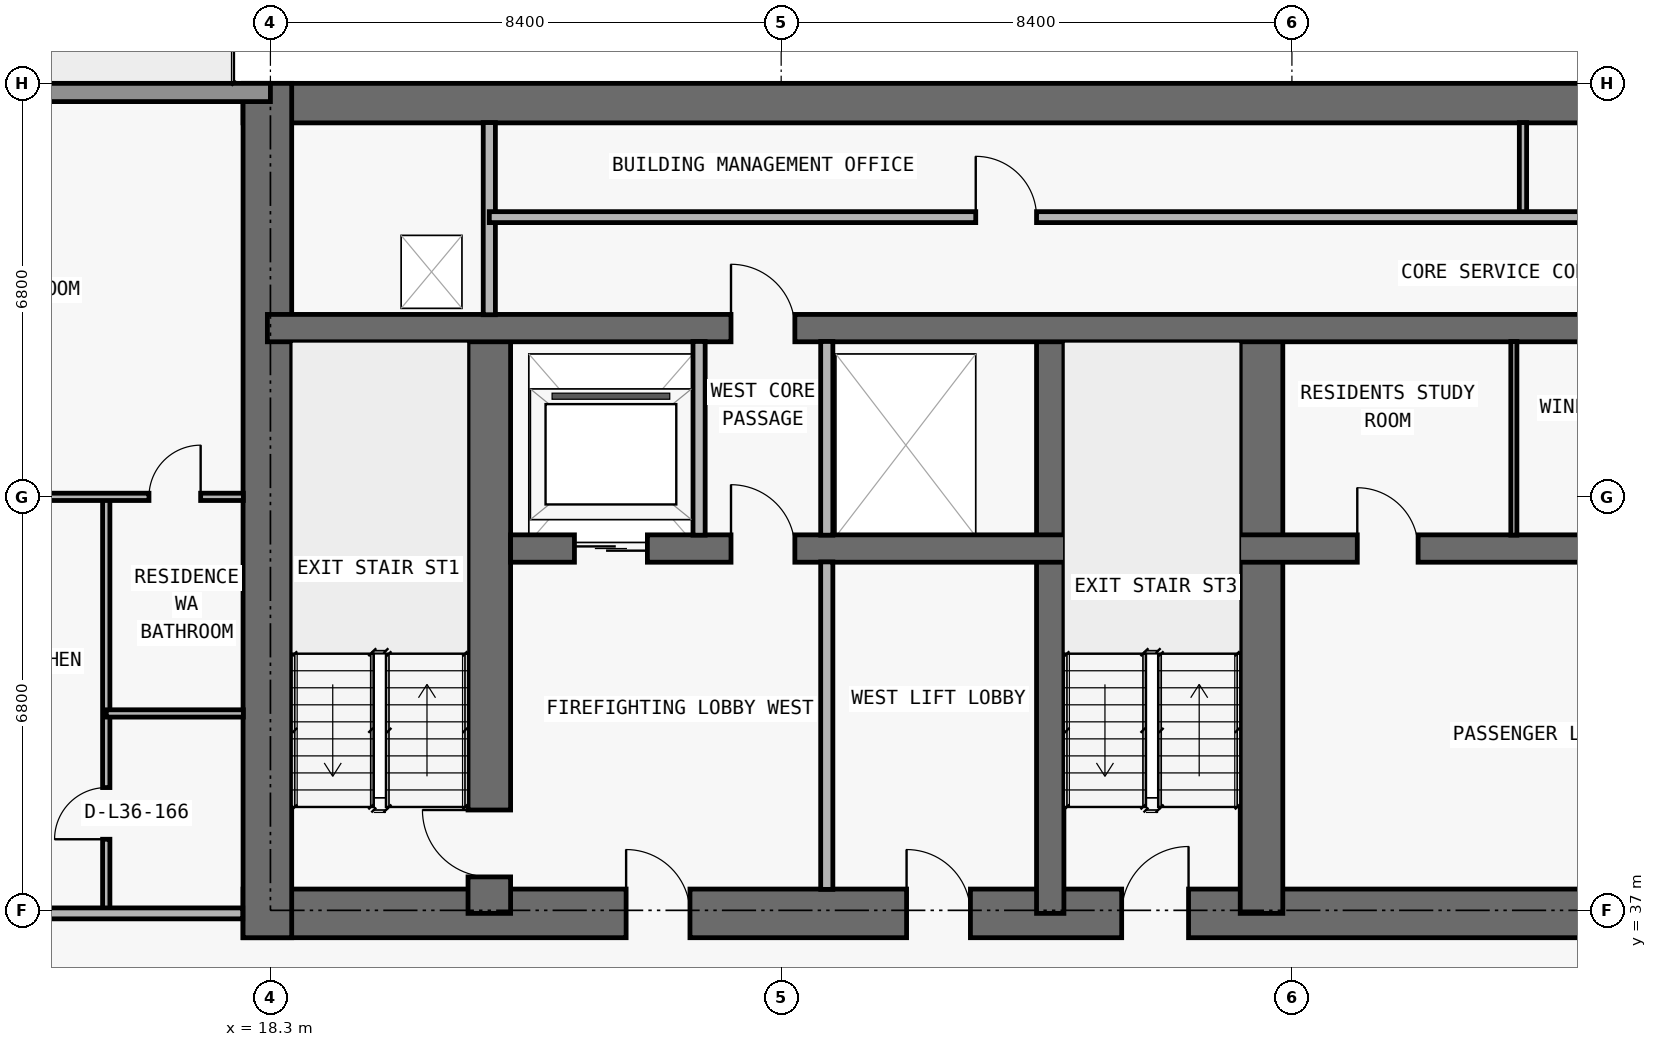
"""IFC4 building model, lengths in metres.
Left out: names, types, materials, properties, quantities, classifications, styles, units other than length and angle.
Written with IfcOpenShell. Run it as: python <this file> out.ifc"""

import sys

from ifc_helpers import new_model, si_unit, direction, frame, frame_2d, origin, place, context, subcontext, project, spatial, rectangle, extrude, element, fill, save


model = new_model("IFC4")
c1 = context("Model", 3, precision=1e-05, world=origin(), true_north=direction((0.0, 1.0)))
c2 = subcontext(c1, "Body", "Model", "MODEL_VIEW")
j1 = project(units=[si_unit("LENGTHUNIT", "METRE"), si_unit("PLANEANGLEUNIT", "RADIAN")], contexts=[c1])
p1 = place(None, origin())
s1 = spatial("IfcSite", under=j1, at=p1, CompositionType="ELEMENT")
p2 = place(p1, origin())
s2 = spatial("IfcBuilding", under=s1, at=p2, CompositionType="ELEMENT")
p3 = place(p2, frame((0.0, 0.0, 132.3)))
s3 = spatial("IfcBuildingStorey", under=s2, at=p3, CompositionType="ELEMENT", Elevation=132.3)
p4 = place(p3, frame((17.85, 36.95, 0.0), z_axis=(0.0, 0.0, 1.0), x_axis=(1.0, 0.0, 0.0)))
e1 = element("IfcWall", 1, at=p4, inside=s3, PredefinedType="SHEAR", context=c2, shape_type="SweptSolid", body=[
    extrude(rectangle(XDim=42.1, YDim=0.8, at=frame_2d((21.05, 0.0))), origin(), (0.0, 0.0, 1.0), 3.05),
])
p5 = place(p4, frame((14.45, 0.0, 0.0)))
e2 = element("IfcOpeningElement", 2, at=p5, cuts=e1, PredefinedType="OPENING", context=c2, shape_type="SweptSolid", body=[
    extrude(rectangle(XDim=1.1, YDim=2.15, at=frame_2d((0.55, 1.075))), frame((0.0, 0.41, 0.0), z_axis=(0.0, -1.0, 0.0), x_axis=(1.0, 0.0, 0.0)), (0.0, 0.0, 1.0), 0.82),
])
p6 = place(p4, frame((6.3, 0.0, 0.0)))
e3 = element("IfcOpeningElement", 3, at=p6, cuts=e1, PredefinedType="OPENING", context=c2, shape_type="SweptSolid", body=[
    extrude(rectangle(XDim=1.05, YDim=2.15, at=frame_2d((0.525, 1.075))), frame((0.0, 0.41, 0.0), z_axis=(0.0, -1.0, 0.0), x_axis=(1.0, 0.0, 0.0)), (0.0, 0.0, 1.0), 0.82),
])
p7 = place(p4, frame((34.8, 0.0, 0.0)))
e4 = element("IfcOpeningElement", 4, at=p7, cuts=e1, PredefinedType="OPENING", context=c2, shape_type="SweptSolid", body=[
    extrude(rectangle(XDim=1.05, YDim=2.15, at=frame_2d((0.525, 1.075))), frame((0.0, 0.41, 0.0), z_axis=(0.0, -1.0, 0.0), x_axis=(1.0, 0.0, 0.0)), (0.0, 0.0, 1.0), 0.82),
])
p8 = place(p4, frame((10.913, 0.0, 0.0)))
e5 = element("IfcOpeningElement", 5, at=p8, cuts=e1, PredefinedType="OPENING", context=c2, shape_type="SweptSolid", body=[
    extrude(rectangle(XDim=1.05, YDim=2.15, at=frame_2d((0.525, 1.075))), frame((0.0, 0.41, 0.0), z_axis=(0.0, -1.0, 0.0), x_axis=(1.0, 0.0, 0.0)), (0.0, 0.0, 1.0), 0.82),
])
p9 = place(p4, frame((24.15, 0.0, 0.0)))
e6 = element("IfcOpeningElement", 6, at=p9, cuts=e1, PredefinedType="OPENING", context=c2, shape_type="SweptSolid", body=[
    extrude(rectangle(XDim=1.05, YDim=2.15, at=frame_2d((0.525, 1.075))), frame((0.0, 0.41, 0.0), z_axis=(0.0, -1.0, 0.0), x_axis=(1.0, 0.0, 0.0)), (0.0, 0.0, 1.0), 0.82),
])
p10 = place(p3, frame((17.85, 50.275, 0.0), z_axis=(0.0, 0.0, 1.0), x_axis=(1.0, 0.0, 0.0)))
e7 = element("IfcWall", 7, at=p10, inside=s3, PredefinedType="SHEAR", context=c2, shape_type="SweptSolid", body=[
    extrude(rectangle(XDim=42.1, YDim=0.65, at=frame_2d((21.05, 0.0))), origin(), (0.0, 0.0, 1.0), 3.05),
])
p11 = place(p3, frame((18.25, 36.55, 0.0), z_axis=(0.0, 0.0, 1.0), x_axis=(0.0, 1.0, 0.0)))
e8 = element("IfcWall", 8, at=p11, inside=s3, PredefinedType="SHEAR", context=c2, shape_type="SweptSolid", body=[
    extrude(rectangle(XDim=14.05, YDim=0.8, at=frame_2d((7.025, 0.0))), origin(), (0.0, 0.0, 1.0), 3.05),
])
p12 = place(p3, frame((21.9, 36.95, 0.0), z_axis=(0.0, 0.0, 1.0), x_axis=(0.0, 1.0, 0.0)))
e9 = element("IfcWall", 9, at=p12, inside=s3, PredefinedType="SHEAR", context=c2, shape_type="SweptSolid", body=[
    extrude(rectangle(XDim=9.625, YDim=0.7, at=frame_2d((4.812, 0.0))), origin(), (0.0, 0.0, 1.0), 3.05),
])
p13 = place(p12, frame((0.6, 0.0, 0.0)))
e10 = element("IfcOpeningElement", 10, at=p13, cuts=e9, PredefinedType="OPENING", context=c2, shape_type="SweptSolid", body=[
    extrude(rectangle(XDim=1.1, YDim=2.15, at=frame_2d((0.55, 1.075))), frame((0.0, 0.36, 0.0), z_axis=(0.0, -1.0, 0.0), x_axis=(1.0, 0.0, 0.0)), (0.0, 0.0, 1.0), 0.72),
])
p14 = place(p3, frame((31.125, 36.95, 0.0), z_axis=(0.0, 0.0, 1.0), x_axis=(0.0, 1.0, 0.0)))
e11 = element("IfcWall", 11, at=p14, inside=s3, PredefinedType="SHEAR", context=c2, shape_type="SweptSolid", body=[
    extrude(rectangle(XDim=9.625, YDim=0.45, at=frame_2d((4.812, 0.0))), origin(), (0.0, 0.0, 1.0), 3.05),
])
p15 = place(p3, frame((34.6, 36.95, 0.0), z_axis=(0.0, 0.0, 1.0), x_axis=(0.0, 1.0, 0.0)))
e12 = element("IfcWall", 12, at=p15, inside=s3, PredefinedType="SHEAR", context=c2, shape_type="SweptSolid", body=[
    extrude(rectangle(XDim=9.625, YDim=0.7, at=frame_2d((4.812, 0.0))), origin(), (0.0, 0.0, 1.0), 3.05),
])
p16 = place(p3, frame((22.25, 42.95, 0.0), z_axis=(0.0, 0.0, 1.0), x_axis=(1.0, 0.0, 0.0)))
e13 = element("IfcWall", 13, at=p16, inside=s3, PredefinedType="SHEAR", context=c2, shape_type="SweptSolid", body=[
    extrude(rectangle(XDim=33.3, YDim=0.45, at=frame_2d((16.65, 0.0))), origin(), (0.0, 0.0, 1.0), 3.05),
])
p17 = place(p16, frame((1.05, 0.0, 0.0)))
e14 = element("IfcOpeningElement", 14, at=p17, cuts=e13, PredefinedType="OPENING", context=c2, shape_type="SweptSolid", body=[
    extrude(rectangle(XDim=1.2, YDim=2.2, at=frame_2d((0.6, 1.1))), frame((0.0, 0.235, 0.0), z_axis=(0.0, -1.0, 0.0), x_axis=(1.0, 0.0, 0.0)), (0.0, 0.0, 1.0), 0.47),
])
p18 = place(p16, frame((31.05, 0.0, 0.0)))
e15 = element("IfcOpeningElement", 15, at=p18, cuts=e13, PredefinedType="OPENING", context=c2, shape_type="SweptSolid", body=[
    extrude(rectangle(XDim=1.2, YDim=2.2, at=frame_2d((0.6, 1.1))), frame((0.0, 0.235, 0.0), z_axis=(0.0, -1.0, 0.0), x_axis=(1.0, 0.0, 0.0)), (0.0, 0.0, 1.0), 0.47),
])
p19 = place(p16, frame((21.4, 0.0, 0.0)))
e16 = element("IfcOpeningElement", 16, at=p19, cuts=e13, PredefinedType="OPENING", context=c2, shape_type="SweptSolid", body=[
    extrude(rectangle(XDim=1.1, YDim=2.2, at=frame_2d((0.55, 1.1))), frame((0.0, 0.235, 0.0), z_axis=(0.0, -1.0, 0.0), x_axis=(1.0, 0.0, 0.0)), (0.0, 0.0, 1.0), 0.47),
])
p20 = place(p16, frame((24.0, 0.0, 0.0)))
e17 = element("IfcOpeningElement", 17, at=p20, cuts=e13, PredefinedType="OPENING", context=c2, shape_type="SweptSolid", body=[
    extrude(rectangle(XDim=1.1, YDim=2.2, at=frame_2d((0.55, 1.1))), frame((0.0, 0.235, 0.0), z_axis=(0.0, -1.0, 0.0), x_axis=(1.0, 0.0, 0.0)), (0.0, 0.0, 1.0), 0.47),
])
p21 = place(p16, frame((3.625, 0.0, 0.0)))
e18 = element("IfcOpeningElement", 18, at=p21, cuts=e13, PredefinedType="OPENING", context=c2, shape_type="SweptSolid", body=[
    extrude(rectangle(XDim=1.05, YDim=2.15, at=frame_2d((0.525, 1.075))), frame((0.0, 0.235, 0.0), z_axis=(0.0, -1.0, 0.0), x_axis=(1.0, 0.0, 0.0)), (0.0, 0.0, 1.0), 0.47),
])
p22 = place(p16, frame((28.675, 0.0, 0.0)))
e19 = element("IfcOpeningElement", 19, at=p22, cuts=e13, PredefinedType="OPENING", context=c2, shape_type="SweptSolid", body=[
    extrude(rectangle(XDim=1.05, YDim=2.15, at=frame_2d((0.525, 1.075))), frame((0.0, 0.235, 0.0), z_axis=(0.0, -1.0, 0.0), x_axis=(1.0, 0.0, 0.0)), (0.0, 0.0, 1.0), 0.47),
])
p23 = place(p16, frame((13.925, 0.0, 0.0)))
e20 = element("IfcOpeningElement", 20, at=p23, cuts=e13, PredefinedType="OPENING", context=c2, shape_type="SweptSolid", body=[
    extrude(rectangle(XDim=1.0, YDim=2.2, at=frame_2d((0.5, 1.1))), frame((0.0, 0.235, 0.0), z_axis=(0.0, -1.0, 0.0), x_axis=(1.0, 0.0, 0.0)), (0.0, 0.0, 1.0), 0.47),
])
p24 = place(p16, frame((18.05, 0.0, 0.0)))
e21 = element("IfcOpeningElement", 21, at=p24, cuts=e13, PredefinedType="OPENING", context=c2, shape_type="SweptSolid", body=[
    extrude(rectangle(XDim=1.0, YDim=2.2, at=frame_2d((0.5, 1.1))), frame((0.0, 0.235, 0.0), z_axis=(0.0, -1.0, 0.0), x_axis=(1.0, 0.0, 0.0)), (0.0, 0.0, 1.0), 0.47),
])
p25 = place(p3, frame((18.25, 46.575, 0.0), z_axis=(0.0, 0.0, 1.0), x_axis=(1.0, 0.0, 0.0)))
e22 = element("IfcWall", 22, at=p25, inside=s3, PredefinedType="SHEAR", context=c2, shape_type="SweptSolid", body=[
    extrude(rectangle(XDim=41.3, YDim=0.45, at=frame_2d((20.65, 0.0))), origin(), (0.0, 0.0, 1.0), 3.05),
])
p26 = place(p25, frame((7.625, 0.0, 0.0)))
e23 = element("IfcOpeningElement", 23, at=p26, cuts=e22, PredefinedType="OPENING", context=c2, shape_type="SweptSolid", body=[
    extrude(rectangle(XDim=1.05, YDim=2.15, at=frame_2d((0.525, 1.075))), frame((0.0, 0.235, 0.0), z_axis=(0.0, -1.0, 0.0), x_axis=(1.0, 0.0, 0.0)), (0.0, 0.0, 1.0), 0.47),
])
p27 = place(p25, frame((32.675, 0.0, 0.0)))
e24 = element("IfcOpeningElement", 24, at=p27, cuts=e22, PredefinedType="OPENING", context=c2, shape_type="SweptSolid", body=[
    extrude(rectangle(XDim=1.05, YDim=2.15, at=frame_2d((0.525, 1.075))), frame((0.0, 0.235, 0.0), z_axis=(0.0, -1.0, 0.0), x_axis=(1.0, 0.0, 0.0)), (0.0, 0.0, 1.0), 0.47),
])
p28 = place(p3, frame((7.7, 50.45, 0.0), z_axis=(0.0, 0.0, 1.0), x_axis=(1.0, 0.0, 0.0)))
e25 = element("IfcWall", 25, at=p28, inside=s3, PredefinedType="STANDARD", context=c2, shape_type="SweptSolid", body=[
    extrude(rectangle(XDim=10.6, YDim=0.3, at=frame_2d((5.3, 0.0))), origin(), (0.0, 0.0, 1.0), 3.05),
])
p29 = place(p28, frame((4.3, 0.0, 0.0)))
e26 = element("IfcOpeningElement", 26, at=p29, cuts=e25, PredefinedType="OPENING", context=c2, shape_type="SweptSolid", body=[
    extrude(rectangle(XDim=2.0, YDim=2.3, at=frame_2d((1.0, 1.15))), frame((0.0, 0.16, 0.0), z_axis=(0.0, -1.0, 0.0), x_axis=(1.0, 0.0, 0.0)), (0.0, 0.0, 1.0), 0.32),
])
p30 = place(p3, frame((15.6, 36.95, 0.0), z_axis=(0.0, 0.0, 1.0), x_axis=(0.0, 1.0, 0.0)))
e27 = element("IfcWall", 27, at=p30, inside=s3, PredefinedType="PARTITIONING", context=c2, shape_type="SweptSolid", body=[
    extrude(rectangle(XDim=6.85, YDim=0.12, at=frame_2d((3.425, 0.0))), origin(), (0.0, 0.0, 1.0), 2.578),
])
p31 = place(p30, frame((1.219, 0.0, 0.0)))
e28 = element("IfcOpeningElement", 28, at=p31, cuts=e27, PredefinedType="OPENING", context=c2, shape_type="SweptSolid", body=[
    extrude(rectangle(XDim=0.85, YDim=2.1, at=frame_2d((0.425, 1.05))), frame((0.0, 0.07, 0.0), z_axis=(0.0, -1.0, 0.0), x_axis=(1.0, 0.0, 0.0)), (0.0, 0.0, 1.0), 0.14),
])
p32 = place(p3, frame((21.9, 46.795, 0.0), z_axis=(0.0, 0.0, 1.0), x_axis=(0.0, 1.0, 0.0)))
e29 = element("IfcWall", 29, at=p32, inside=s3, PredefinedType="PARTITIONING", context=c2, shape_type="SweptSolid", body=[
    extrude(rectangle(XDim=3.16, YDim=0.2, at=frame_2d((1.58, 0.0))), origin(), (0.0, 0.0, 1.0), 3.05),
])
p33 = place(p3, frame((25.35, 43.17, 0.0), z_axis=(0.0, 0.0, 1.0), x_axis=(0.0, 1.0, 0.0)))
e30 = element("IfcWall", 30, at=p33, inside=s3, PredefinedType="PARTITIONING", context=c2, shape_type="SweptSolid", body=[
    extrude(rectangle(XDim=3.185, YDim=0.2, at=frame_2d((1.593, 0.0))), origin(), (0.0, 0.0, 1.0), 3.05),
])
p34 = place(p3, frame((27.45, 37.345, 0.0), z_axis=(0.0, 0.0, 1.0), x_axis=(0.0, 1.0, 0.0)))
e31 = element("IfcWall", 31, at=p34, inside=s3, PredefinedType="PARTITIONING", context=c2, shape_type="SweptSolid", body=[
    extrude(rectangle(XDim=5.385, YDim=0.2, at=frame_2d((2.692, 0.0))), origin(), (0.0, 0.0, 1.0), 3.05),
])
p35 = place(p3, frame((27.45, 43.17, 0.0), z_axis=(0.0, 0.0, 1.0), x_axis=(0.0, 1.0, 0.0)))
e32 = element("IfcWall", 32, at=p35, inside=s3, PredefinedType="PARTITIONING", context=c2, shape_type="SweptSolid", body=[
    extrude(rectangle(XDim=3.185, YDim=0.2, at=frame_2d((1.593, 0.0))), origin(), (0.0, 0.0, 1.0), 3.05),
])
p36 = place(p3, frame((38.75, 43.17, 0.0), z_axis=(0.0, 0.0, 1.0), x_axis=(0.0, 1.0, 0.0)))
e33 = element("IfcWall", 33, at=p36, inside=s3, PredefinedType="MOVABLE", context=c2, shape_type="SweptSolid", body=[
    extrude(rectangle(XDim=3.185, YDim=0.1, at=frame_2d((1.593, 0.0))), origin(), (0.0, 0.0, 1.0), 3.05),
])
p37 = place(p3, frame((38.9, 48.4, 0.0), z_axis=(0.0, 0.0, 1.0), x_axis=(0.0, 1.0, 0.0)))
e34 = element("IfcWall", 34, at=p37, inside=s3, PredefinedType="PARTITIONING", context=c2, shape_type="SweptSolid", body=[
    extrude(rectangle(XDim=1.555, YDim=0.12, at=frame_2d((0.778, 0.0))), origin(), (0.0, 0.0, 1.0), 3.05),
])
p38 = place(p3, frame((7.7, 36.95, 0.0), z_axis=(0.0, 0.0, 1.0), x_axis=(1.0, 0.0, 0.0)))
e35 = element("IfcWall", 35, at=p38, inside=s3, PredefinedType="PARTITIONING", context=c2, shape_type="SweptSolid", body=[
    extrude(rectangle(XDim=10.145, YDim=0.18, at=frame_2d((5.073, 0.0))), origin(), (0.0, 0.0, 1.0), 3.05),
])
p39 = place(p38, frame((5.188, 0.0, 0.0)))
e36 = element("IfcOpeningElement", 36, at=p39, cuts=e35, PredefinedType="OPENING", context=c2, shape_type="SweptSolid", body=[
    extrude(rectangle(XDim=1.0, YDim=2.2, at=frame_2d((0.5, 1.1))), frame((0.0, 0.1, 0.0), z_axis=(0.0, -1.0, 0.0), x_axis=(1.0, 0.0, 0.0)), (0.0, 0.0, 1.0), 0.2),
])
p40 = place(p3, frame((15.6, 40.238, 0.0), z_axis=(0.0, 0.0, 1.0), x_axis=(1.0, 0.0, 0.0)))
e37 = element("IfcWall", 37, at=p40, inside=s3, PredefinedType="PARTITIONING", context=c2, shape_type="SweptSolid", body=[
    extrude(rectangle(XDim=2.255, YDim=0.12, at=frame_2d((1.127, 0.0))), origin(), (0.0, 0.0, 1.0), 3.05),
])
p41 = place(p3, frame((4.195, 43.8, 0.0), z_axis=(0.0, 0.0, 1.0), x_axis=(1.0, 0.0, 0.0)))
e38 = element("IfcWall", 38, at=p41, inside=s3, PredefinedType="PARTITIONING", context=c2, shape_type="SweptSolid", body=[
    extrude(rectangle(XDim=13.66, YDim=0.12, at=frame_2d((6.83, 0.0))), origin(), (0.0, 0.0, 1.0), 2.339),
])
p42 = place(p41, frame((8.743, 0.0, 0.0)))
e39 = element("IfcOpeningElement", 39, at=p42, cuts=e38, PredefinedType="OPENING", context=c2, shape_type="SweptSolid", body=[
    extrude(rectangle(XDim=0.9, YDim=2.15, at=frame_2d((0.45, 1.075))), frame((0.0, 0.07, 0.0), z_axis=(0.0, -1.0, 0.0), x_axis=(1.0, 0.0, 0.0)), (0.0, 0.0, 1.0), 0.14),
])
p43 = place(p41, frame((12.107, 0.0, 0.0)))
e40 = element("IfcOpeningElement", 40, at=p43, cuts=e38, PredefinedType="OPENING", context=c2, shape_type="SweptSolid", body=[
    extrude(rectangle(XDim=0.85, YDim=2.1, at=frame_2d((0.425, 1.05))), frame((0.0, 0.07, 0.0), z_axis=(0.0, -1.0, 0.0), x_axis=(1.0, 0.0, 0.0)), (0.0, 0.0, 1.0), 0.14),
])
p44 = place(p3, frame((21.9, 48.4, 0.0), z_axis=(0.0, 0.0, 1.0), x_axis=(1.0, 0.0, 0.0)))
e41 = element("IfcWall", 41, at=p44, inside=s3, PredefinedType="PARTITIONING", context=c2, shape_type="SweptSolid", body=[
    extrude(rectangle(XDim=33.986, YDim=0.18, at=frame_2d((16.993, 0.0))), origin(), (0.0, 0.0, 1.0), 3.05),
])
p45 = place(p44, frame((8.0, 0.0, 0.0)))
e42 = element("IfcOpeningElement", 42, at=p45, cuts=e41, PredefinedType="OPENING", context=c2, shape_type="SweptSolid", body=[
    extrude(rectangle(XDim=1.0, YDim=2.2, at=frame_2d((0.5, 1.1))), frame((0.0, 0.1, 0.0), z_axis=(0.0, -1.0, 0.0), x_axis=(1.0, 0.0, 0.0)), (0.0, 0.0, 1.0), 0.2),
])
p46 = place(p44, frame((24.993, 0.0, 0.0)))
e43 = element("IfcOpeningElement", 43, at=p46, cuts=e41, PredefinedType="OPENING", context=c2, shape_type="SweptSolid", body=[
    extrude(rectangle(XDim=1.0, YDim=2.2, at=frame_2d((0.5, 1.1))), frame((0.0, 0.1, 0.0), z_axis=(0.0, -1.0, 0.0), x_axis=(1.0, 0.0, 0.0)), (0.0, 0.0, 1.0), 0.2),
])
p47 = place(p17, origin())
e44 = element("IfcDoor", 44, at=p47, inside=s3, OperationType="DOUBLE_DOOR_SLIDING", PredefinedType="DOOR", context=c2, shape_type="SweptSolid", body=[
    extrude(rectangle(XDim=1.2, YDim=2.2, at=frame_2d((0.6, 1.1))), frame((0.0, 0.025, 0.0), z_axis=(0.0, -1.0, 0.0), x_axis=(1.0, 0.0, 0.0)), (0.0, 0.0, 1.0), 0.05),
])
fill(e14, e44)
p48 = place(p5, origin())
e45 = element("IfcDoor", 45, at=p48, inside=s3, OperationType="SINGLE_SWING_RIGHT", PredefinedType="DOOR", context=c2, shape_type="SweptSolid", body=[
    extrude(rectangle(XDim=1.1, YDim=2.15, at=frame_2d((0.55, 1.075))), frame((0.0, 0.025, 0.0), z_axis=(0.0, -1.0, 0.0), x_axis=(1.0, 0.0, 0.0)), (0.0, 0.0, 1.0), 0.05),
])
fill(e2, e45)
p49 = place(p6, origin())
e46 = element("IfcDoor", 46, at=p49, inside=s3, OperationType="SINGLE_SWING_LEFT", PredefinedType="DOOR", context=c2, shape_type="SweptSolid", body=[
    extrude(rectangle(XDim=1.05, YDim=2.15, at=frame_2d((0.525, 1.075))), frame((0.0, 0.025, 0.0), z_axis=(0.0, -1.0, 0.0), x_axis=(1.0, 0.0, 0.0)), (0.0, 0.0, 1.0), 0.05),
])
fill(e3, e46)
p50 = place(p13, origin())
e47 = element("IfcDoor", 47, at=p50, inside=s3, OperationType="SINGLE_SWING_RIGHT", PredefinedType="DOOR", context=c2, shape_type="SweptSolid", body=[
    extrude(rectangle(XDim=1.1, YDim=2.15, at=frame_2d((0.55, 1.075))), frame((0.0, 0.025, 0.0), z_axis=(0.0, -1.0, 0.0), x_axis=(1.0, 0.0, 0.0)), (0.0, 0.0, 1.0), 0.05),
])
fill(e10, e47)
p51 = place(p21, origin())
e48 = element("IfcDoor", 48, at=p51, inside=s3, OperationType="SINGLE_SWING_LEFT", PredefinedType="DOOR", context=c2, shape_type="SweptSolid", body=[
    extrude(rectangle(XDim=1.05, YDim=2.15, at=frame_2d((0.525, 1.075))), frame((0.0, 0.025, 0.0), z_axis=(0.0, -1.0, 0.0), x_axis=(1.0, 0.0, 0.0)), (0.0, 0.0, 1.0), 0.05),
])
fill(e18, e48)
p52 = place(p8, origin())
e49 = element("IfcDoor", 49, at=p52, inside=s3, OperationType="SINGLE_SWING_LEFT", PredefinedType="DOOR", context=c2, shape_type="SweptSolid", body=[
    extrude(rectangle(XDim=1.05, YDim=2.15, at=frame_2d((0.525, 1.075))), frame((0.0, 0.025, 0.0), z_axis=(0.0, -1.0, 0.0), x_axis=(1.0, 0.0, 0.0)), (0.0, 0.0, 1.0), 0.05),
])
fill(e5, e49)
p53 = place(p23, origin())
e50 = element("IfcDoor", 50, at=p53, inside=s3, OperationType="SINGLE_SWING_LEFT", PredefinedType="DOOR", context=c2, shape_type="SweptSolid", body=[
    extrude(rectangle(XDim=1.0, YDim=2.2, at=frame_2d((0.5, 1.1))), frame((0.0, 0.025, 0.0), z_axis=(0.0, -1.0, 0.0), x_axis=(1.0, 0.0, 0.0)), (0.0, 0.0, 1.0), 0.05),
])
fill(e20, e50)
p54 = place(p26, origin())
e51 = element("IfcDoor", 51, at=p54, inside=s3, OperationType="SINGLE_SWING_LEFT", PredefinedType="DOOR", context=c2, shape_type="SweptSolid", body=[
    extrude(rectangle(XDim=1.05, YDim=2.15, at=frame_2d((0.525, 1.075))), frame((0.0, 0.025, 0.0), z_axis=(0.0, -1.0, 0.0), x_axis=(1.0, 0.0, 0.0)), (0.0, 0.0, 1.0), 0.05),
])
fill(e23, e51)
p55 = place(p45, origin())
e52 = element("IfcDoor", 52, at=p55, inside=s3, OperationType="SINGLE_SWING_LEFT", PredefinedType="DOOR", context=c2, shape_type="SweptSolid", body=[
    extrude(rectangle(XDim=1.0, YDim=2.2, at=frame_2d((0.5, 1.1))), frame((0.0, 0.025, 0.0), z_axis=(0.0, -1.0, 0.0), x_axis=(1.0, 0.0, 0.0)), (0.0, 0.0, 1.0), 0.05),
])
fill(e42, e52)
p56 = place(p31, origin())
e53 = element("IfcDoor", 53, at=p56, inside=s3, OperationType="SINGLE_SWING_LEFT", PredefinedType="DOOR", context=c2, shape_type="SweptSolid", body=[
    extrude(rectangle(XDim=0.85, YDim=2.1, at=frame_2d((0.425, 1.05))), frame((0.0, 0.025, 0.0), z_axis=(0.0, -1.0, 0.0), x_axis=(1.0, 0.0, 0.0)), (0.0, 0.0, 1.0), 0.05),
])
fill(e28, e53)
p57 = place(p43, origin())
e54 = element("IfcDoor", 54, at=p57, inside=s3, OperationType="SINGLE_SWING_RIGHT", PredefinedType="DOOR", context=c2, shape_type="SweptSolid", body=[
    extrude(rectangle(XDim=0.85, YDim=2.1, at=frame_2d((0.425, 1.05))), frame((0.0, 0.025, 0.0), z_axis=(0.0, -1.0, 0.0), x_axis=(1.0, 0.0, 0.0)), (0.0, 0.0, 1.0), 0.05),
])
fill(e40, e54)
save(model, sys.argv[1])
